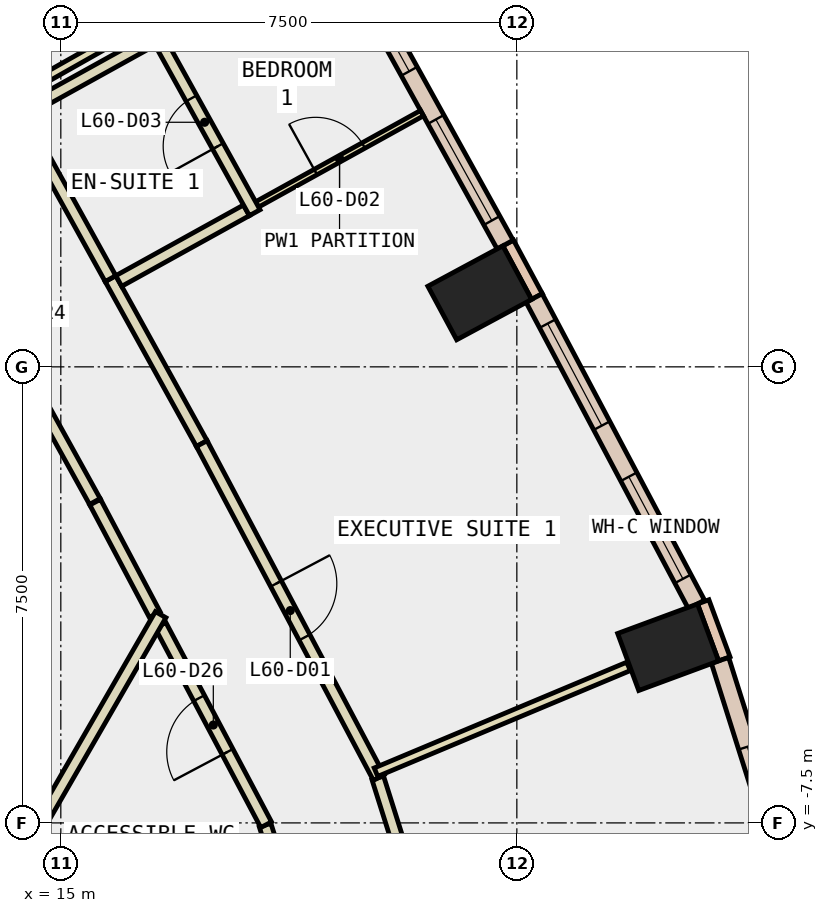
"""IFC4 building model, lengths in metres.
Left out: names, types, materials, properties, quantities, classifications, styles, units other than length and angle.
Written with IfcOpenShell. Run it as: python <this file> out.ifc"""

import sys

from ifc_helpers import new_model, si_unit, direction, frame, frame_2d, origin, origin_2d, place, context, subcontext, project, spatial, rectangle, extrude, element, fill, save


model = new_model("IFC4")
c1 = context("Model", 3, precision=1e-05, world=origin(), true_north=direction((0.0, 1.0)))
c2 = subcontext(c1, "Body", "Model", "MODEL_VIEW")
j1 = project(units=[si_unit("LENGTHUNIT", "METRE"), si_unit("PLANEANGLEUNIT", "RADIAN")], contexts=[c1])
p1 = place(None, origin())
s1 = spatial("IfcSite", under=j1, at=p1, CompositionType="ELEMENT")
p2 = place(p1, origin())
s2 = spatial("IfcBuilding", under=s1, at=p2, CompositionType="ELEMENT")
p3 = place(p2, frame((0.0, 0.0, 263.0)))
s3 = spatial("IfcBuildingStorey", under=s2, at=p3, CompositionType="ELEMENT", Elevation=263.0)
for number, where, z_axis, x_axis in (
    (1, (24.988, -4.611, -0.34), (0.0, 0.0, 1.0), (-0.347, 0.938, 0.0)),
    (2, (21.89, 1.217, -0.34), (0.0, 0.0, 1.0), (-0.474, 0.881, 0.0)),
):
    element("IfcColumn", number, at=place(p3, frame(where, z_axis=z_axis, x_axis=x_axis)), inside=s3, PredefinedType="COLUMN", context=c2, shape_type="SweptSolid", body=[
        extrude(rectangle(XDim=1.0, YDim=1.4, at=origin_2d()), origin(), (0.0, 0.0, 1.0), 3.6),
    ])
p4 = place(p3, frame((7.578, -4.375, -0.34), z_axis=(0.0, 0.0, 1.0), x_axis=(0.866024315419, -0.5000018851, 0.0)))
e3 = element("IfcWall", 3, at=p4, inside=s3, PredefinedType="SHEAR", context=c2, shape_type="SweptSolid", body=[
    extrude(rectangle(XDim=9.0, YDim=0.8, at=frame_2d((4.5, 0.0))), origin(), (0.0, 0.0, 1.0), 3.6),
])
p5 = place(p3, frame((25.912, -4.803, 0.0), z_axis=(0.0, 0.0, 1.0), x_axis=(-0.347107644204, 0.937825294677, 0.0)))
e4 = element("IfcWall", 4, at=p5, inside=s3, PredefinedType="STANDARD", context=c2, shape_type="SweptSolid", body=[
    extrude(rectangle(XDim=1.0, YDim=0.2, at=frame_2d((0.5, 0.0))), origin(), (0.0, 0.0, 1.0), 3.26),
])
p6 = place(p3, frame((22.831, 1.156, 0.0), z_axis=(0.0, 0.0, 1.0), x_axis=(-0.473852444207, 0.880604259085, 0.0)))
e5 = element("IfcWall", 5, at=p6, inside=s3, PredefinedType="STANDARD", context=c2, shape_type="SweptSolid", body=[
    extrude(rectangle(XDim=1.0, YDim=0.2, at=frame_2d((0.5, 0.0))), origin(), (0.0, 0.0, 1.0), 3.26),
])
p7 = place(p3, frame((27.161, -9.004, 0.0), z_axis=(0.0, 0.0, 1.0), x_axis=(-0.30108868778, 0.953596142028, 0.0)))
e6 = element("IfcWall", 6, at=p7, inside=s3, PredefinedType="STANDARD", context=c2, shape_type="SweptSolid", body=[
    extrude(rectangle(XDim=4.38, YDim=0.3, at=frame_2d((2.19, 0.0))), origin(), (0.0, 0.0, 1.0), 3.26),
])
p8 = place(p7, frame((1.49, 0.0, 0.9)))
e7 = element("IfcOpeningElement", 7, at=p8, cuts=e6, PredefinedType="OPENING", context=c2, shape_type="SweptSolid", body=[
    extrude(rectangle(XDim=1.4, YDim=2.0, at=frame_2d((0.7, 1.0))), frame((0.0, 0.16, 0.0), z_axis=(0.0, -1.0, 0.0), x_axis=(1.0, 0.0, 0.0)), (0.0, 0.0, 1.0), 0.32),
])
p9 = place(p3, frame((25.454, -3.907, 0.0), z_axis=(0.0, 0.0, 1.0), x_axis=(-0.468220106253, 0.883611867338, 0.0)))
e8 = element("IfcWall", 8, at=p9, inside=s3, PredefinedType="STANDARD", context=c2, shape_type="SweptSolid", body=[
    extrude(rectangle(XDim=5.703, YDim=0.3, at=frame_2d((2.852, 0.0))), origin(), (0.0, 0.0, 1.0), 3.26),
])
p10 = place(p9, frame((0.476, 0.0, 0.9)))
e9 = element("IfcOpeningElement", 9, at=p10, cuts=e8, PredefinedType="OPENING", context=c2, shape_type="SweptSolid", body=[
    extrude(rectangle(XDim=1.9, YDim=2.0, at=frame_2d((0.95, 1.0))), frame((0.0, 0.16, 0.0), z_axis=(0.0, -1.0, 0.0), x_axis=(1.0, 0.0, 0.0)), (0.0, 0.0, 1.0), 0.32),
])
p11 = place(p9, frame((3.327, 0.0, 0.9)))
e10 = element("IfcOpeningElement", 10, at=p11, cuts=e8, PredefinedType="OPENING", context=c2, shape_type="SweptSolid", body=[
    extrude(rectangle(XDim=1.9, YDim=2.0, at=frame_2d((0.95, 1.0))), frame((0.0, 0.16, 0.0), z_axis=(0.0, -1.0, 0.0), x_axis=(1.0, 0.0, 0.0)), (0.0, 0.0, 1.0), 0.32),
])
p12 = place(p3, frame((22.308, 2.01, 0.0), z_axis=(0.0, 0.0, 1.0), x_axis=(-0.484260568952, 0.874923826032, 0.0)))
e11 = element("IfcWall", 11, at=p12, inside=s3, PredefinedType="STANDARD", context=c2, shape_type="SweptSolid", body=[
    extrude(rectangle(XDim=5.611, YDim=0.3, at=frame_2d((2.805, 0.0))), origin(), (0.0, 0.0, 1.0), 3.26),
])
p13 = place(p12, frame((0.453, 0.0, 0.9)))
e12 = element("IfcOpeningElement", 12, at=p13, cuts=e11, PredefinedType="OPENING", context=c2, shape_type="SweptSolid", body=[
    extrude(rectangle(XDim=1.9, YDim=2.0, at=frame_2d((0.95, 1.0))), frame((0.0, 0.16, 0.0), z_axis=(0.0, -1.0, 0.0), x_axis=(1.0, 0.0, 0.0)), (0.0, 0.0, 1.0), 0.32),
])
p14 = place(p12, frame((3.258, 0.0, 0.9)))
e13 = element("IfcOpeningElement", 13, at=p14, cuts=e11, PredefinedType="OPENING", context=c2, shape_type="SweptSolid", body=[
    extrude(rectangle(XDim=1.9, YDim=2.0, at=frame_2d((0.95, 1.0))), frame((0.0, 0.16, 0.0), z_axis=(0.0, -1.0, 0.0), x_axis=(1.0, 0.0, 0.0)), (0.0, 0.0, 1.0), 0.32),
])
p15 = place(p3, frame((16.545, -4.074, 0.0), z_axis=(0.0, 0.0, 1.0), x_axis=(-0.468321873419, 0.883557934081, 0.0)))
e14 = element("IfcWall", 14, at=p15, inside=s3, PredefinedType="PARTITIONING", context=c2, shape_type="SweptSolid", body=[
    extrude(rectangle(XDim=2.093, YDim=0.2, at=frame_2d((1.046, 0.0))), origin(), (0.0, 0.0, 1.0), 3.26),
])
p16 = place(p3, frame((15.56, -2.214, 0.0), z_axis=(0.0, 0.0, 1.0), x_axis=(-0.484323615817, 0.874888927329, 0.0)))
e15 = element("IfcWall", 15, at=p16, inside=s3, PredefinedType="PARTITIONING", context=c2, shape_type="SweptSolid", body=[
    extrude(rectangle(XDim=4.747, YDim=0.2, at=frame_2d((2.374, 0.0))), origin(), (0.0, 0.0, 1.0), 3.26),
])
p17 = place(p16, frame((1.874, 0.0, 0.0)))
e16 = element("IfcOpeningElement", 16, at=p17, cuts=e15, PredefinedType="OPENING", context=c2, shape_type="SweptSolid", body=[
    extrude(rectangle(XDim=1.0, YDim=2.1, at=frame_2d((0.5, 1.05))), frame((0.0, 0.11, 0.0), z_axis=(0.0, -1.0, 0.0), x_axis=(1.0, 0.0, 0.0)), (0.0, 0.0, 1.0), 0.22),
])
p18 = place(p3, frame((19.104, -9.891, 0.0), z_axis=(0.0, 0.0, 1.0), x_axis=(-0.301325410186, 0.953521366922, 0.0)))
e17 = element("IfcWall", 17, at=p18, inside=s3, PredefinedType="PARTITIONING", context=c2, shape_type="SweptSolid", body=[
    extrude(rectangle(XDim=2.469, YDim=0.2, at=frame_2d((1.234, 0.0))), origin(), (0.0, 0.0, 1.0), 3.26),
])
p19 = place(p3, frame((18.377, -7.53, 0.0), z_axis=(0.0, 0.0, 1.0), x_axis=(-0.468214048123, 0.883615077474, 0.0)))
e18 = element("IfcWall", 18, at=p19, inside=s3, PredefinedType="PARTITIONING", context=c2, shape_type="SweptSolid", body=[
    extrude(rectangle(XDim=3.712, YDim=0.2, at=frame_2d((1.856, 0.0))), origin(), (0.0, 0.0, 1.0), 3.26),
])
p20 = place(p19, frame((1.356, 0.0, 0.0)))
e19 = element("IfcOpeningElement", 19, at=p20, cuts=e18, PredefinedType="OPENING", context=c2, shape_type="SweptSolid", body=[
    extrude(rectangle(XDim=1.0, YDim=2.1, at=frame_2d((0.5, 1.05))), frame((0.0, 0.11, 0.0), z_axis=(0.0, -1.0, 0.0), x_axis=(1.0, 0.0, 0.0)), (0.0, 0.0, 1.0), 0.22),
])
p21 = place(p3, frame((20.213, -6.761, 0.0), z_axis=(0.0, 0.0, 1.0), x_axis=(0.301331608119, -0.953519408271, 0.0)))
e20 = element("IfcWall", 20, at=p21, inside=s3, PredefinedType="PARTITIONING", context=c2, shape_type="SweptSolid", body=[
    extrude(rectangle(XDim=3.209, YDim=0.2, at=frame_2d((1.604, 0.0))), origin(), (0.0, 0.0, 1.0), 3.26),
])
p22 = place(p3, frame((15.817, 1.451, 0.0), z_axis=(0.0, 0.0, 1.0), x_axis=(0.48417811398, -0.874969458863, 0.0)))
e21 = element("IfcWall", 21, at=p22, inside=s3, PredefinedType="PARTITIONING", context=c2, shape_type="SweptSolid", body=[
    extrude(rectangle(XDim=3.101, YDim=0.2, at=frame_2d((1.55, 0.0))), origin(), (0.0, 0.0, 1.0), 3.26),
])
p23 = place(p3, frame((17.318, -1.262, 0.0), z_axis=(0.0, 0.0, 1.0), x_axis=(0.468313568794, -0.883562335822, 0.0)))
e22 = element("IfcWall", 22, at=p23, inside=s3, PredefinedType="PARTITIONING", context=c2, shape_type="SweptSolid", body=[
    extrude(rectangle(XDim=6.216, YDim=0.2, at=frame_2d((3.108, 0.0))), origin(), (0.0, 0.0, 1.0), 3.26),
])
p24 = place(p23, frame((2.608, 0.0, 0.0)))
e23 = element("IfcOpeningElement", 23, at=p24, cuts=e22, PredefinedType="OPENING", context=c2, shape_type="SweptSolid", body=[
    extrude(rectangle(XDim=1.0, YDim=2.1, at=frame_2d((0.5, 1.05))), frame((0.0, 0.11, 0.0), z_axis=(0.0, -1.0, 0.0), x_axis=(1.0, 0.0, 0.0)), (0.0, 0.0, 1.0), 0.22),
])
p25 = place(p3, frame((14.267, 4.25, 0.0), z_axis=(0.0, 0.0, 1.0), x_axis=(0.4843920198, -0.874851056554, 0.0)))
e24 = element("IfcWall", 24, at=p25, inside=s3, PredefinedType="PARTITIONING", context=c2, shape_type="SweptSolid", body=[
    extrude(rectangle(XDim=3.199, YDim=0.2, at=frame_2d((1.6, 0.0))), origin(), (0.0, 0.0, 1.0), 3.26),
])
p26 = place(p3, frame((16.642, -4.075, 0.0), z_axis=(0.0, 0.0, 1.0), x_axis=(-0.49980426207, -0.866138383641, 0.0)))
e25 = element("IfcWall", 25, at=p26, inside=s3, PredefinedType="PARTITIONING", context=c2, shape_type="SweptSolid", body=[
    extrude(rectangle(XDim=4.392, YDim=0.2, at=frame_2d((2.196, 0.0))), origin(), (0.0, 0.0, 1.0), 3.26),
])
p27 = place(p3, frame((20.183, -6.666, 0.0), z_axis=(0.0, 0.0, 1.0), x_axis=(0.922347108299, 0.386362280525, 0.0)))
e26 = element("IfcWall", 26, at=p27, inside=s3, PredefinedType="PARTITIONING", context=c2, shape_type="SweptSolid", body=[
    extrude(rectangle(XDim=4.503, YDim=0.15, at=frame_2d((2.252, 0.0))), origin(), (0.0, 0.0, 1.0), 3.26),
])
p28 = place(p3, frame((18.228, 2.671, 0.0), z_axis=(0.0, 0.0, 1.0), x_axis=(0.874895591854, 0.484311576729, 0.0)))
e27 = element("IfcWall", 27, at=p28, inside=s3, PredefinedType="PARTITIONING", context=c2, shape_type="SweptSolid", body=[
    extrude(rectangle(XDim=3.1, YDim=0.1, at=frame_2d((1.55, 0.0))), origin(), (0.0, 0.0, 1.0), 3.26),
])
p29 = place(p28, frame((1.1, 0.0, 0.0)))
e28 = element("IfcOpeningElement", 28, at=p29, cuts=e27, PredefinedType="OPENING", context=c2, shape_type="SweptSolid", body=[
    extrude(rectangle(XDim=0.9, YDim=2.1, at=frame_2d((0.45, 1.05))), frame((0.0, 0.06, 0.0), z_axis=(0.0, -1.0, 0.0), x_axis=(1.0, 0.0, 0.0)), (0.0, 0.0, 1.0), 0.12),
])
p30 = place(p3, frame((15.953, 1.412, 0.0), z_axis=(0.0, 0.0, 1.0), x_axis=(0.875014790305, 0.484096185429, 0.0)))
e29 = element("IfcWall", 29, at=p30, inside=s3, PredefinedType="PARTITIONING", context=c2, shape_type="SweptSolid", body=[
    extrude(rectangle(XDim=2.4, YDim=0.2, at=frame_2d((1.2, 0.0))), origin(), (0.0, 0.0, 1.0), 3.26),
])
p31 = place(p3, frame((18.189, 2.535, 0.0), z_axis=(0.0, 0.0, 1.0), x_axis=(-0.484447408253, 0.874820386501, 0.0)))
e30 = element("IfcWall", 30, at=p31, inside=s3, PredefinedType="PARTITIONING", context=c2, shape_type="SweptSolid", body=[
    extrude(rectangle(XDim=3.4, YDim=0.2, at=frame_2d((1.7, 0.0))), origin(), (0.0, 0.0, 1.0), 3.26),
])
p32 = place(p31, frame((1.25, 0.0, 0.0)))
e31 = element("IfcOpeningElement", 31, at=p32, cuts=e30, PredefinedType="OPENING", context=c2, shape_type="SweptSolid", body=[
    extrude(rectangle(XDim=0.9, YDim=2.1, at=frame_2d((0.45, 1.05))), frame((0.0, 0.11, 0.0), z_axis=(0.0, -1.0, 0.0), x_axis=(1.0, 0.0, 0.0)), (0.0, 0.0, 1.0), 0.22),
])
p33 = place(p3, frame((16.503, 5.374, 0.0), z_axis=(0.0, 0.0, 1.0), x_axis=(-0.874847389013, -0.484398643615, 0.0)))
e32 = element("IfcWall", 32, at=p33, inside=s3, PredefinedType="PARTITIONING", context=c2, shape_type="SweptSolid", body=[
    extrude(rectangle(XDim=2.5, YDim=0.2, at=frame_2d((1.25, 0.0))), origin(), (0.0, 0.0, 1.0), 3.26),
])
p34 = place(p3, frame((14.083, 4.377, 0.0), z_axis=(0.0, 0.0, 1.0), x_axis=(0.870415885751, 0.492317159799, 0.0)))
e33 = element("IfcWall", 33, at=p34, inside=s3, PredefinedType="PARTITIONING", context=c2, shape_type="SweptSolid", body=[
    extrude(rectangle(XDim=4.581, YDim=0.15, at=frame_2d((2.29, 0.0))), origin(), (0.0, 0.0, 1.0), 3.26),
])
p35 = place(p8, origin())
e34 = element("IfcWindow", 34, at=p35, inside=s3, PartitioningType="SINGLE_PANEL", PredefinedType="WINDOW", context=c2, shape_type="SweptSolid", body=[
    extrude(rectangle(XDim=1.4, YDim=2.0, at=frame_2d((0.7, 1.0))), frame((0.0, 0.03, 0.0), z_axis=(0.0, -1.0, 0.0), x_axis=(1.0, 0.0, 0.0)), (0.0, 0.0, 1.0), 0.06),
])
fill(e7, e34)
p36 = place(p10, origin())
e35 = element("IfcWindow", 35, at=p36, inside=s3, PartitioningType="SINGLE_PANEL", PredefinedType="WINDOW", context=c2, shape_type="SweptSolid", body=[
    extrude(rectangle(XDim=1.9, YDim=2.0, at=frame_2d((0.95, 1.0))), frame((0.0, 0.03, 0.0), z_axis=(0.0, -1.0, 0.0), x_axis=(1.0, 0.0, 0.0)), (0.0, 0.0, 1.0), 0.06),
])
fill(e9, e35)
p37 = place(p11, origin())
e36 = element("IfcWindow", 36, at=p37, inside=s3, PartitioningType="SINGLE_PANEL", PredefinedType="WINDOW", context=c2, shape_type="SweptSolid", body=[
    extrude(rectangle(XDim=1.9, YDim=2.0, at=frame_2d((0.95, 1.0))), frame((0.0, 0.03, 0.0), z_axis=(0.0, -1.0, 0.0), x_axis=(1.0, 0.0, 0.0)), (0.0, 0.0, 1.0), 0.06),
])
fill(e10, e36)
p38 = place(p13, origin())
e37 = element("IfcWindow", 37, at=p38, inside=s3, PartitioningType="SINGLE_PANEL", PredefinedType="WINDOW", context=c2, shape_type="SweptSolid", body=[
    extrude(rectangle(XDim=1.9, YDim=2.0, at=frame_2d((0.95, 1.0))), frame((0.0, 0.03, 0.0), z_axis=(0.0, -1.0, 0.0), x_axis=(1.0, 0.0, 0.0)), (0.0, 0.0, 1.0), 0.06),
])
fill(e12, e37)
p39 = place(p14, origin())
e38 = element("IfcWindow", 38, at=p39, inside=s3, PartitioningType="SINGLE_PANEL", PredefinedType="WINDOW", context=c2, shape_type="SweptSolid", body=[
    extrude(rectangle(XDim=1.9, YDim=2.0, at=frame_2d((0.95, 1.0))), frame((0.0, 0.03, 0.0), z_axis=(0.0, -1.0, 0.0), x_axis=(1.0, 0.0, 0.0)), (0.0, 0.0, 1.0), 0.06),
])
fill(e13, e38)
p40 = place(p24, origin())
e39 = element("IfcDoor", 39, at=p40, inside=s3, OperationType="SINGLE_SWING_LEFT", PredefinedType="DOOR", context=c2, shape_type="SweptSolid", body=[
    extrude(rectangle(XDim=1.0, YDim=2.1, at=frame_2d((0.5, 1.05))), frame((0.0, 0.025, 0.0), z_axis=(0.0, -1.0, 0.0), x_axis=(1.0, 0.0, 0.0)), (0.0, 0.0, 1.0), 0.05),
])
fill(e23, e39)
p41 = place(p29, origin())
e40 = element("IfcDoor", 40, at=p41, inside=s3, OperationType="SINGLE_SWING_RIGHT", PredefinedType="DOOR", context=c2, shape_type="SweptSolid", body=[
    extrude(rectangle(XDim=0.9, YDim=2.1, at=frame_2d((0.45, 1.05))), frame((0.0, 0.025, 0.0), z_axis=(0.0, -1.0, 0.0), x_axis=(1.0, 0.0, 0.0)), (0.0, 0.0, 1.0), 0.05),
])
fill(e28, e40)
p42 = place(p32, origin())
e41 = element("IfcDoor", 41, at=p42, inside=s3, OperationType="SINGLE_SWING_LEFT", PredefinedType="DOOR", context=c2, shape_type="SweptSolid", body=[
    extrude(rectangle(XDim=0.9, YDim=2.1, at=frame_2d((0.45, 1.05))), frame((0.0, 0.025, 0.0), z_axis=(0.0, -1.0, 0.0), x_axis=(1.0, 0.0, 0.0)), (0.0, 0.0, 1.0), 0.05),
])
fill(e31, e41)
p43 = place(p20, origin())
e42 = element("IfcDoor", 42, at=p43, inside=s3, OperationType="SINGLE_SWING_RIGHT", PredefinedType="DOOR", context=c2, shape_type="SweptSolid", body=[
    extrude(rectangle(XDim=1.0, YDim=2.1, at=frame_2d((0.5, 1.05))), frame((0.0, 0.025, 0.0), z_axis=(0.0, -1.0, 0.0), x_axis=(1.0, 0.0, 0.0)), (0.0, 0.0, 1.0), 0.05),
])
fill(e19, e42)
save(model, sys.argv[1])
